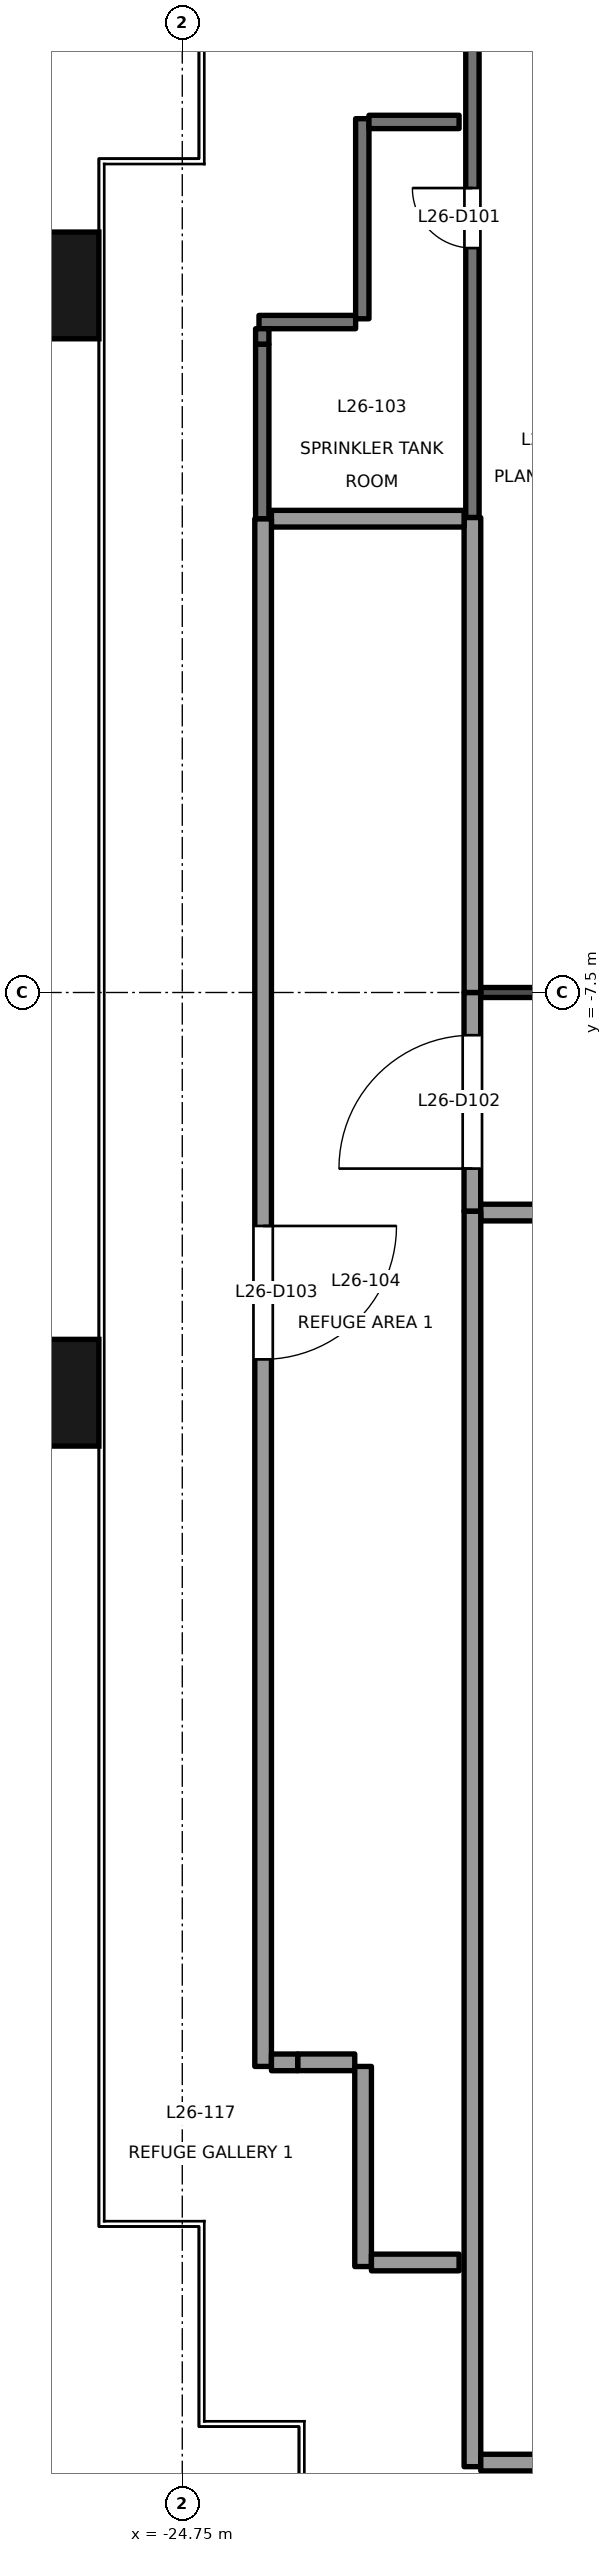
"""IFC4 building model, lengths in metres.
Left out: names, types, materials, properties, quantities, classifications, styles, units other than length and angle.
Written with IfcOpenShell. Run it as: python <this file> out.ifc"""

import sys

from ifc_helpers import new_model, si_unit, direction, frame, frame_2d, origin, origin_2d, place, context, subcontext, project, spatial, rectangle, extrude, element, fill, save


model = new_model("IFC4")
c1 = context("Model", 3, precision=1e-05, world=origin(), true_north=direction((0.0, 1.0)))
c2 = subcontext(c1, "Body", "Model", "MODEL_VIEW")
j1 = project(units=[si_unit("LENGTHUNIT", "METRE"), si_unit("PLANEANGLEUNIT", "RADIAN")], contexts=[c1])
p1 = place(None, origin())
s1 = spatial("IfcSite", under=j1, at=p1, CompositionType="ELEMENT")
p2 = place(p1, origin())
s2 = spatial("IfcBuilding", under=s1, at=p2, CompositionType="ELEMENT")
p3 = place(p2, frame((0.0, 0.0, 115.7)))
s3 = spatial("IfcBuildingStorey", under=s2, at=p3, CompositionType="ELEMENT", Elevation=115.7)
for number, where, z_axis, x_axis in (
    (1, (-26.9, -13.5, -0.2), (0.0, 0.0, 1.0), (0.0, 1.0, 0.0)),
    (2, (-26.9, 3.1, -0.2), (0.0, 0.0, 1.0), (0.0, 1.0, 0.0)),
):
    element("IfcColumn", number, at=place(p3, frame(where, z_axis=z_axis, x_axis=x_axis)), inside=s3, PredefinedType="COLUMN", context=c2, shape_type="SweptSolid", body=[
        extrude(rectangle(XDim=1.6, YDim=1.8, at=origin_2d()), origin(), (0.0, 0.0, 1.0), 5.0),
    ])
p4 = place(p3, frame((-20.275, -7.5, 0.0), z_axis=(0.0, 0.0, 1.0), x_axis=(1.0, 0.0, 0.0)))
e3 = element("IfcWall", 3, at=p4, inside=s3, PredefinedType="PARTITIONING", context=c2, shape_type="SweptSolid", body=[
    extrude(rectangle(XDim=2.295, YDim=0.15, at=frame_2d((1.147, 0.0))), origin(), (0.0, 0.0, 1.0), 4.8),
])
p5 = place(p3, frame((-20.401, -10.78, 0.0), z_axis=(0.0, 0.0, 1.0), x_axis=(0.0, 1.0, 0.0)))
e4 = element("IfcWall", 4, at=p5, inside=s3, PredefinedType="PARTITIONING", context=c2, shape_type="SweptSolid", body=[
    extrude(rectangle(XDim=3.28, YDim=0.25, at=frame_2d((1.64, 0.0))), origin(), (0.0, 0.0, 1.0), 4.8),
])
p6 = place(p5, frame((0.64, 0.0, 0.0)))
e5 = element("IfcOpeningElement", 5, at=p6, cuts=e4, PredefinedType="OPENING", context=c2, shape_type="SweptSolid", body=[
    extrude(rectangle(XDim=2.0, YDim=2.1, at=frame_2d((1.0, 1.05))), frame((0.0, 0.135, 0.0), z_axis=(0.0, -1.0, 0.0), x_axis=(1.0, 0.0, 0.0)), (0.0, 0.0, 1.0), 0.271),
])
p7 = place(p3, frame((-14.215, -10.799, 0.0), z_axis=(0.0, 0.0, 1.0), x_axis=(-1.0, 0.0, 0.0)))
e6 = element("IfcWall", 6, at=p7, inside=s3, PredefinedType="PARTITIONING", context=c2, shape_type="SweptSolid", body=[
    extrude(rectangle(XDim=6.06, YDim=0.25, at=frame_2d((3.03, 0.0))), origin(), (0.0, 0.0, 1.0), 4.8),
])
p8 = place(p7, frame((2.03, 0.0, 0.0)))
e7 = element("IfcOpeningElement", 7, at=p8, cuts=e6, PredefinedType="OPENING", context=c2, shape_type="SweptSolid", body=[
    extrude(rectangle(XDim=2.0, YDim=2.1, at=frame_2d((1.0, 1.05))), frame((0.0, 0.135, 0.0), z_axis=(0.0, -1.0, 0.0), x_axis=(1.0, 0.0, 0.0)), (0.0, 0.0, 1.0), 0.271),
])
p9 = place(p3, frame((-20.4, -0.38, 0.0), z_axis=(0.0, 0.0, 1.0), x_axis=(0.0, 1.0, 0.0)))
e8 = element("IfcWall", 8, at=p9, inside=s3, PredefinedType="PARTITIONING", context=c2, shape_type="SweptSolid", body=[
    extrude(rectangle(XDim=8.98, YDim=0.2, at=frame_2d((4.49, 0.0))), origin(), (0.0, 0.0, 1.0), 4.3),
])
p10 = place(p9, frame((4.04, 0.0, 0.0)))
e9 = element("IfcOpeningElement", 9, at=p10, cuts=e8, PredefinedType="OPENING", context=c2, shape_type="SweptSolid", body=[
    extrude(rectangle(XDim=0.9, YDim=2.1, at=frame_2d((0.45, 1.05))), frame((0.0, 0.111, 0.0), z_axis=(0.0, -1.0, 0.0), x_axis=(1.0, 0.0, 0.0)), (0.0, 0.0, 1.0), 0.221),
])
p11 = place(p3, frame((-20.4, -7.5, 0.0), z_axis=(0.0, 0.0, 1.0), x_axis=(0.0, 1.0, 0.0)))
e10 = element("IfcWall", 10, at=p11, inside=s3, PredefinedType="PARTITIONING", context=c2, shape_type="SweptSolid", body=[
    extrude(rectangle(XDim=7.12, YDim=0.25, at=frame_2d((3.56, 0.0))), origin(), (0.0, 0.0, 1.0), 4.4),
])
p12 = place(p3, frame((-20.525, -0.397, 0.0), z_axis=(0.0, 0.0, 1.0), x_axis=(-1.0, 0.0, 0.0)))
e11 = element("IfcWall", 11, at=p12, inside=s3, PredefinedType="PARTITIONING", context=c2, shape_type="SweptSolid", body=[
    extrude(rectangle(XDim=2.888, YDim=0.25, at=frame_2d((1.444, 0.0))), origin(), (0.0, 0.0, 1.0), 4.8),
])
p13 = place(p3, frame((-23.551, -0.4, 0.0), z_axis=(0.0, 0.0, 1.0), x_axis=(0.0, 1.0, 0.0)))
e12 = element("IfcWall", 12, at=p13, inside=s3, PredefinedType="PARTITIONING", context=c2, shape_type="SweptSolid", body=[
    extrude(rectangle(XDim=2.62, YDim=0.2, at=frame_2d((1.31, 0.0))), origin(), (0.0, 0.0, 1.0), 4.4),
])
p14 = place(p3, frame((-23.6, 2.551, 0.0), z_axis=(0.0, 0.0, 1.0), x_axis=(1.0, 0.0, 0.0)))
e13 = element("IfcWall", 13, at=p14, inside=s3, PredefinedType="PARTITIONING", context=c2, shape_type="SweptSolid", body=[
    extrude(rectangle(XDim=1.449, YDim=0.2, at=frame_2d((0.725, 0.0))), origin(), (0.0, 0.0, 1.0), 4.8),
])
p15 = place(p3, frame((-23.551, 2.22, 0.0), z_axis=(0.0, 0.0, 1.0), x_axis=(0.0, 1.0, 0.0)))
e14 = element("IfcWall", 14, at=p15, inside=s3, PredefinedType="PARTITIONING", context=c2, shape_type="SweptSolid", body=[
    extrude(rectangle(XDim=0.231, YDim=0.2, at=frame_2d((0.115, 0.0))), origin(), (0.0, 0.0, 1.0), 4.8),
])
p16 = place(p3, frame((-22.051, 2.6, 0.0), z_axis=(0.0, 0.0, 1.0), x_axis=(0.0, 1.0, 0.0)))
e15 = element("IfcWall", 15, at=p16, inside=s3, PredefinedType="PARTITIONING", context=c2, shape_type="SweptSolid", body=[
    extrude(rectangle(XDim=3.0, YDim=0.2, at=frame_2d((1.5, 0.0))), origin(), (0.0, 0.0, 1.0), 4.3),
])
p17 = place(p3, frame((-21.951, 5.551, 0.0), z_axis=(0.0, 0.0, 1.0), x_axis=(1.0, 0.0, 0.0)))
e16 = element("IfcWall", 16, at=p17, inside=s3, PredefinedType="PARTITIONING", context=c2, shape_type="SweptSolid", body=[
    extrude(rectangle(XDim=1.351, YDim=0.2, at=frame_2d((0.675, 0.0))), origin(), (0.0, 0.0, 1.0), 4.8),
])
p18 = place(p3, frame((-20.4, -10.78, 0.0), z_axis=(0.0, 0.0, 1.0), x_axis=(0.0, -1.0, 0.0)))
e17 = element("IfcWall", 17, at=p18, inside=s3, PredefinedType="PARTITIONING", context=c2, shape_type="SweptSolid", body=[
    extrude(rectangle(XDim=18.82, YDim=0.25, at=frame_2d((9.41, 0.0))), origin(), (0.0, 0.0, 1.0), 4.8),
])
p19 = place(p3, frame((-22.164, -23.538, 0.0), z_axis=(0.0, 0.0, 1.0), x_axis=(-1.0, 0.0, 0.0)))
e18 = element("IfcWall", 18, at=p19, inside=s3, PredefinedType="PARTITIONING", context=c2, shape_type="SweptSolid", body=[
    extrude(rectangle(XDim=0.856, YDim=0.25, at=frame_2d((0.428, 0.0))), origin(), (0.0, 0.0, 1.0), 4.8),
])
p20 = place(p3, frame((-22.039, -26.6, 0.0), z_axis=(0.0, 0.0, 1.0), x_axis=(0.0, 1.0, 0.0)))
e19 = element("IfcWall", 19, at=p20, inside=s3, PredefinedType="PARTITIONING", context=c2, shape_type="SweptSolid", body=[
    extrude(rectangle(XDim=3.0, YDim=0.25, at=frame_2d((1.5, 0.0))), origin(), (0.0, 0.0, 1.0), 4.8),
])
p21 = place(p3, frame((-20.6, -26.539, 0.0), z_axis=(0.0, 0.0, 1.0), x_axis=(-1.0, 0.0, 0.0)))
e20 = element("IfcWall", 20, at=p21, inside=s3, PredefinedType="PARTITIONING", context=c2, shape_type="SweptSolid", body=[
    extrude(rectangle(XDim=1.314, YDim=0.25, at=frame_2d((0.657, 0.0))), origin(), (0.0, 0.0, 1.0), 4.8),
])
p22 = place(p3, frame((-23.538, -0.4, 0.0), z_axis=(0.0, 0.0, 1.0), x_axis=(0.0, -1.0, 0.0)))
e21 = element("IfcWall", 21, at=p22, inside=s3, PredefinedType="PARTITIONING", context=c2, shape_type="SweptSolid", body=[
    extrude(rectangle(XDim=23.2, YDim=0.25, at=frame_2d((11.6, 0.0))), origin(), (0.0, 0.0, 1.0), 4.4),
])
p23 = place(p22, frame((10.6, 0.0, 0.0)))
e22 = element("IfcOpeningElement", 22, at=p23, cuts=e21, PredefinedType="OPENING", context=c2, shape_type="SweptSolid", body=[
    extrude(rectangle(XDim=2.0, YDim=2.1, at=frame_2d((1.0, 1.05))), frame((0.0, 0.135, 0.0), z_axis=(0.0, -1.0, 0.0), x_axis=(1.0, 0.0, 0.0)), (0.0, 0.0, 1.0), 0.271),
])
p24 = place(p3, frame((-23.02, -23.539, 0.0), z_axis=(0.0, 0.0, 1.0), x_axis=(-1.0, 0.0, 0.0)))
e23 = element("IfcWall", 23, at=p24, inside=s3, PredefinedType="PARTITIONING", context=c2, shape_type="SweptSolid", body=[
    extrude(rectangle(XDim=0.393, YDim=0.25, at=frame_2d((0.197, 0.0))), origin(), (0.0, 0.0, 1.0), 4.8),
])
p25 = place(p3, frame((-20.275, -29.539, 0.0), z_axis=(0.0, 0.0, 1.0), x_axis=(1.0, 0.0, 0.0)))
e24 = element("IfcWall", 24, at=p25, inside=s3, PredefinedType="PARTITIONING", context=c2, shape_type="SweptSolid", body=[
    extrude(rectangle(XDim=11.915, YDim=0.25, at=frame_2d((5.958, 0.0))), origin(), (0.0, 0.0, 1.0), 2.75),
])
p26 = place(p25, frame((4.957, 0.0, 0.0)))
e25 = element("IfcOpeningElement", 25, at=p26, cuts=e24, PredefinedType="OPENING", context=c2, shape_type="SweptSolid", body=[
    extrude(rectangle(XDim=2.0, YDim=2.1, at=frame_2d((1.0, 1.05))), frame((0.0, 0.135, 0.0), z_axis=(0.0, -1.0, 0.0), x_axis=(1.0, 0.0, 0.0)), (0.0, 0.0, 1.0), 0.271),
])
p27 = place(p10, origin())
e26 = element("IfcDoor", 26, at=p27, inside=s3, OperationType="SINGLE_SWING_RIGHT", PredefinedType="DOOR", context=c2, shape_type="SweptSolid", body=[
    extrude(rectangle(XDim=0.9, YDim=2.1, at=frame_2d((0.45, 1.05))), frame((0.0, 0.025, 0.0), z_axis=(0.0, -1.0, 0.0), x_axis=(1.0, 0.0, 0.0)), (0.0, 0.0, 1.0), 0.05),
])
fill(e9, e26)
p28 = place(p6, origin())
e27 = element("IfcDoor", 27, at=p28, inside=s3, OperationType="DOUBLE_DOOR_SINGLE_SWING", PredefinedType="DOOR", context=c2, shape_type="SweptSolid", body=[
    extrude(rectangle(XDim=2.0, YDim=2.1, at=frame_2d((1.0, 1.05))), frame((0.0, 0.025, 0.0), z_axis=(0.0, -1.0, 0.0), x_axis=(1.0, 0.0, 0.0)), (0.0, 0.0, 1.0), 0.05),
])
fill(e5, e27)
p29 = place(p23, origin())
e28 = element("IfcDoor", 28, at=p29, inside=s3, OperationType="DOUBLE_DOOR_SINGLE_SWING", PredefinedType="DOOR", context=c2, shape_type="SweptSolid", body=[
    extrude(rectangle(XDim=2.0, YDim=2.1, at=frame_2d((1.0, 1.05))), frame((0.0, 0.025, 0.0), z_axis=(0.0, -1.0, 0.0), x_axis=(1.0, 0.0, 0.0)), (0.0, 0.0, 1.0), 0.05),
])
fill(e22, e28)
save(model, sys.argv[1])
